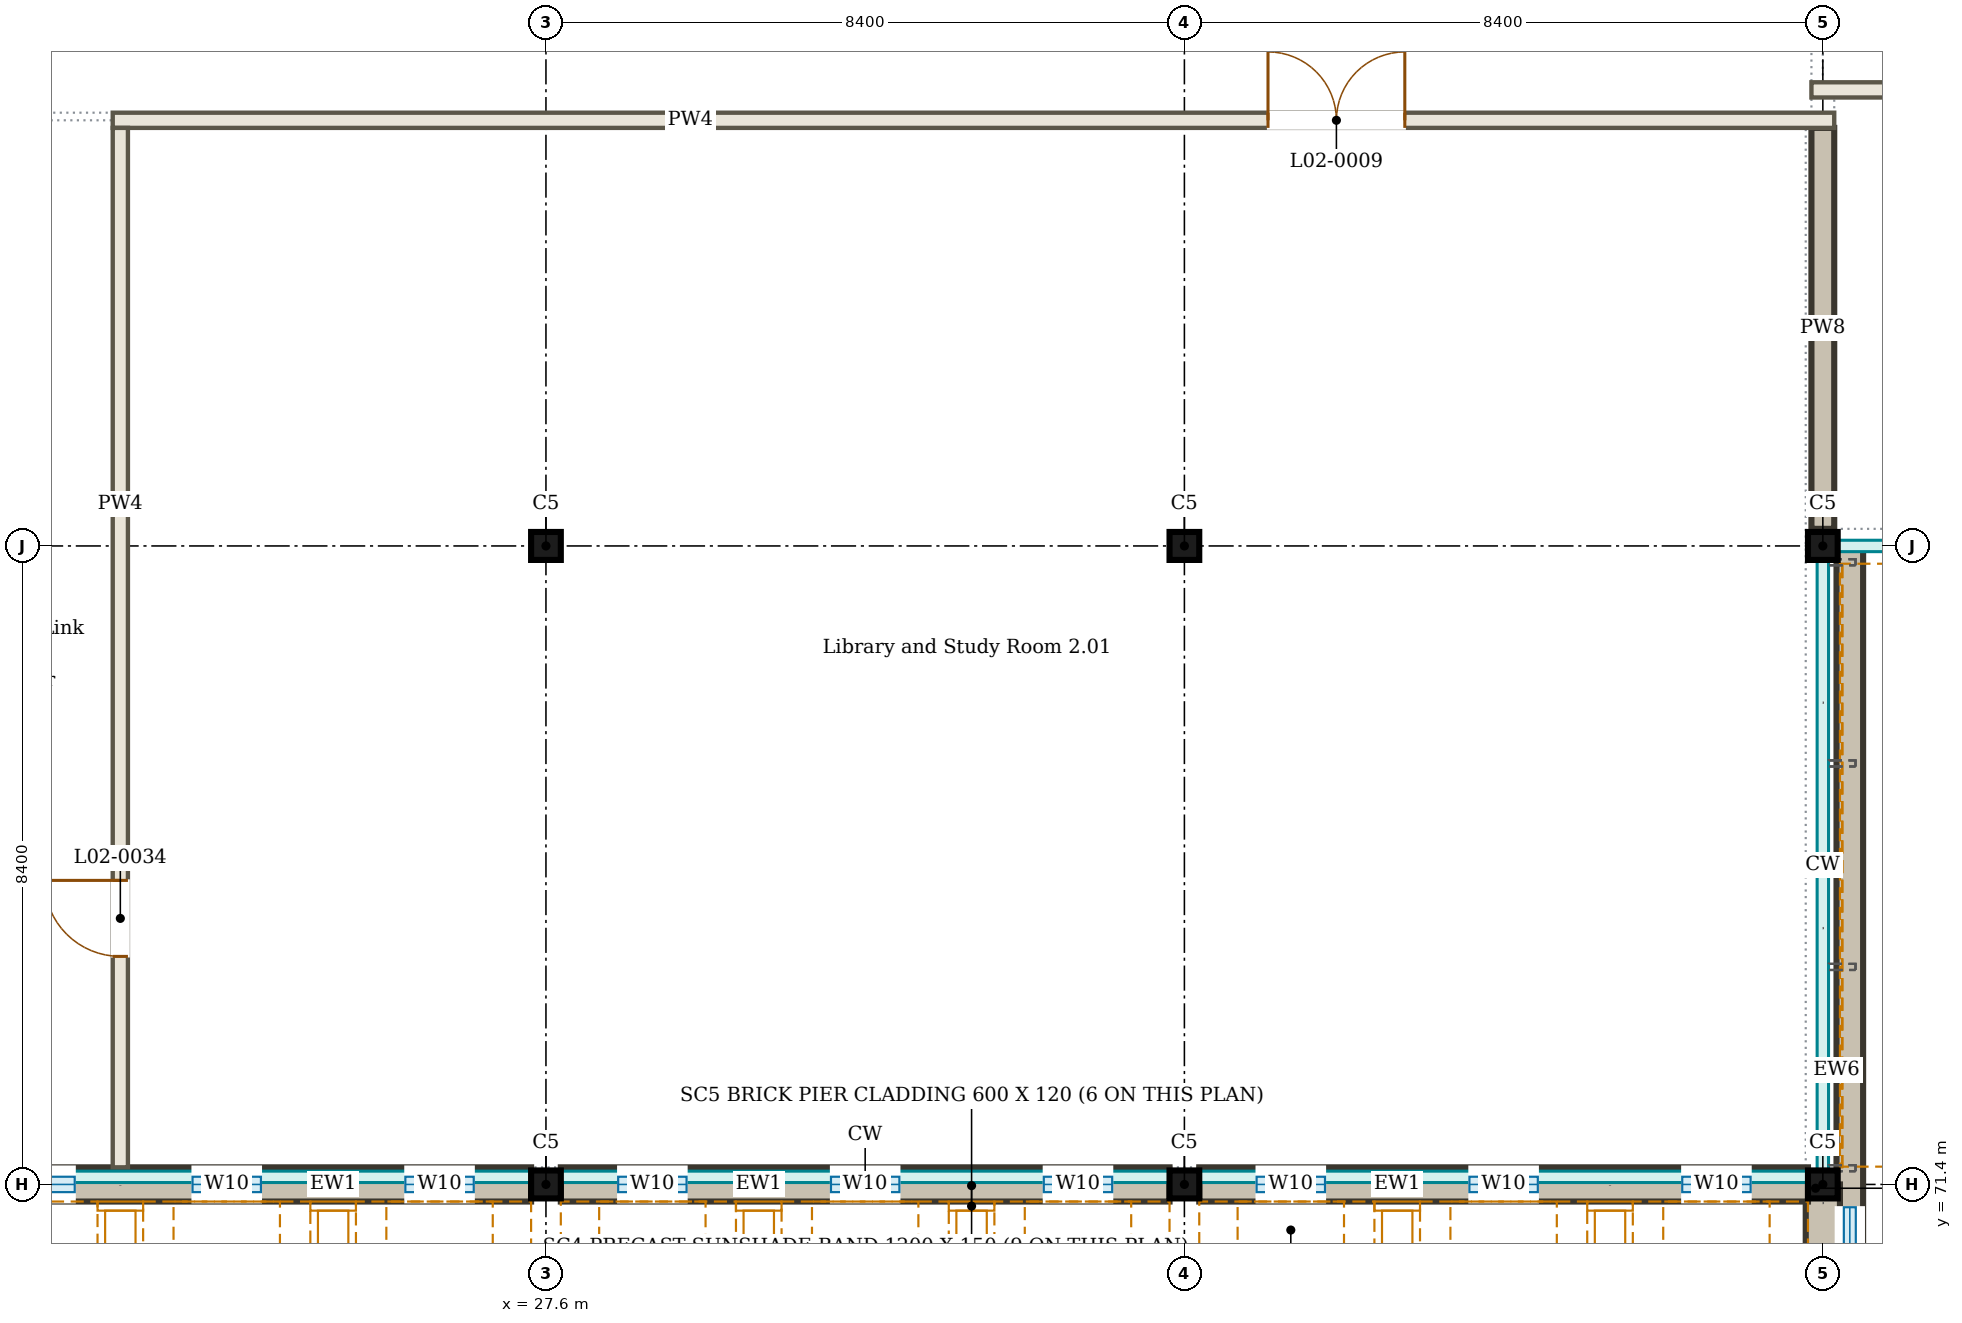
"""IFC4 building model, lengths in metres.
Left out: names, types, materials, properties, quantities, classifications, styles, units other than length and angle.
Written with IfcOpenShell. Run it as: python <this file> out.ifc"""

import sys

from ifc_helpers import new_model, si_unit, direction, frame, frame_2d, origin, origin_2d, place, context, subcontext, project, spatial, polyline, rectangle, i_section, outline, extrude, element, fill, save


model = new_model("IFC4")
c1 = context("Model", 3, precision=1e-05, world=origin(), true_north=direction((0.0, 1.0)))
c2 = subcontext(c1, "Body", "Model", "MODEL_VIEW")
j1 = project(units=[si_unit("LENGTHUNIT", "METRE"), si_unit("PLANEANGLEUNIT", "RADIAN")], contexts=[c1])
p1 = place(None, origin())
s1 = spatial("IfcSite", under=j1, at=p1, CompositionType="ELEMENT")
p2 = place(p1, origin())
s2 = spatial("IfcBuilding", under=s1, at=p2, CompositionType="ELEMENT")
p3 = place(p2, frame((0.0, 0.0, 9.0)))
s3 = spatial("IfcBuildingStorey", under=s2, at=p3, CompositionType="ELEMENT", Elevation=9.0)
for number, where, z_axis, x_axis in (
    (1, (27.6, 71.4, 0.0), (0.0, 0.0, 1.0), (1.0, 0.0, 0.0)),
    (2, (36.0, 71.4, 0.0), (0.0, 0.0, 1.0), (1.0, 0.0, 0.0)),
    (3, (44.4, 71.4, 0.0), (0.0, 0.0, 1.0), (1.0, 0.0, 0.0)),
    (4, (27.6, 79.8, 0.0), (0.0, 0.0, 1.0), (1.0, 0.0, 0.0)),
    (5, (36.0, 79.8, 0.0), (0.0, 0.0, 1.0), (1.0, 0.0, 0.0)),
    (6, (44.4, 79.8, 0.0), (0.0, 0.0, 1.0), (1.0, 0.0, 0.0)),
):
    element("IfcColumn", number, at=place(p3, frame(where, z_axis=z_axis, x_axis=x_axis)), inside=s3, PredefinedType="COLUMN", context=c2, shape_type="SweptSolid", body=[
        extrude(i_section(OverallWidth=0.391, OverallDepth=0.368, WebThickness=0.015, FlangeThickness=0.024, FilletRadius=0.027, at=origin_2d()), origin(), (0.0, 0.0, 1.0), 4.5),
    ])
p4 = place(p3, frame((44.56, 71.584, 3.87), z_axis=(0.0, 0.0, 1.0), x_axis=(0.0, 1.0, 0.0)))
e7 = element("IfcWall", 7, at=p4, inside=s3, PredefinedType="SOLIDWALL", context=c2, shape_type="SweptSolid", body=[
    extrude(rectangle(XDim=8.032, YDim=0.13, at=frame_2d((4.016, 0.0))), origin(), (0.0, 0.0, 1.0), 0.63),
])
p5 = place(p3, frame((19.2, 71.4, 0.0), z_axis=(0.0, 0.0, 1.0), x_axis=(1.0, 0.0, 0.0)))
e8 = element("IfcWall", 8, at=p5, inside=s3, PredefinedType="SOLIDWALL", context=c2, shape_type="SweptSolid", body=[
    extrude(rectangle(XDim=8.205, YDim=0.45, at=frame_2d((4.102, 0.0))), origin(), (0.0, 0.0, 1.0), 3.85),
])
p6 = place(p5, frame((0.6, 0.0, 2.7)))
e9 = element("IfcOpeningElement", 9, at=p6, cuts=e8, PredefinedType="OPENING", context=c2, shape_type="SweptSolid", body=[
    extrude(rectangle(XDim=1.6, YDim=0.6, at=frame_2d((0.8, 0.3))), frame((0.0, 0.235, 0.0), z_axis=(0.0, -1.0, 0.0), x_axis=(1.0, 0.0, 0.0)), (0.0, 0.0, 1.0), 0.47),
])
p7 = place(p5, frame((3.75, 0.0, 1.0)))
e10 = element("IfcOpeningElement", 10, at=p7, cuts=e8, PredefinedType="OPENING", context=c2, shape_type="SweptSolid", body=[
    extrude(rectangle(XDim=0.9, YDim=1.2, at=frame_2d((0.45, 0.6))), frame((0.0, 0.235, 0.0), z_axis=(0.0, -1.0, 0.0), x_axis=(1.0, 0.0, 0.0)), (0.0, 0.0, 1.0), 0.47),
])
p8 = place(p5, frame((6.55, 0.0, 1.0)))
e11 = element("IfcOpeningElement", 11, at=p8, cuts=e8, PredefinedType="OPENING", context=c2, shape_type="SweptSolid", body=[
    extrude(rectangle(XDim=0.9, YDim=1.2, at=frame_2d((0.45, 0.6))), frame((0.0, 0.235, 0.0), z_axis=(0.0, -1.0, 0.0), x_axis=(1.0, 0.0, 0.0)), (0.0, 0.0, 1.0), 0.47),
])
p9 = place(p3, frame((19.2, 71.24, 3.87), z_axis=(0.0, 0.0, 1.0), x_axis=(1.0, 0.0, 0.0)))
e12 = element("IfcWall", 12, at=p9, inside=s3, PredefinedType="SOLIDWALL", context=c2, shape_type="SweptSolid", body=[
    extrude(rectangle(XDim=8.205, YDim=0.13, at=frame_2d((4.102, 0.0))), origin(), (0.0, 0.0, 1.0), 0.63),
])
p10 = place(p3, frame((27.795, 71.4, 0.0), z_axis=(0.0, 0.0, 1.0), x_axis=(1.0, 0.0, 0.0)))
e13 = element("IfcWall", 13, at=p10, inside=s3, PredefinedType="SOLIDWALL", context=c2, shape_type="SweptSolid", body=[
    extrude(rectangle(XDim=8.009, YDim=0.45, at=frame_2d((4.004, 0.0))), origin(), (0.0, 0.0, 1.0), 3.85),
])
p11 = place(p10, frame((0.754, 0.0, 1.0)))
e14 = element("IfcOpeningElement", 14, at=p11, cuts=e13, PredefinedType="OPENING", context=c2, shape_type="SweptSolid", body=[
    extrude(rectangle(XDim=0.9, YDim=1.2, at=frame_2d((0.45, 0.6))), frame((0.0, 0.235, 0.0), z_axis=(0.0, -1.0, 0.0), x_axis=(1.0, 0.0, 0.0)), (0.0, 0.0, 1.0), 0.47),
])
p12 = place(p10, frame((3.554, 0.0, 1.0)))
e15 = element("IfcOpeningElement", 15, at=p12, cuts=e13, PredefinedType="OPENING", context=c2, shape_type="SweptSolid", body=[
    extrude(rectangle(XDim=0.9, YDim=1.2, at=frame_2d((0.45, 0.6))), frame((0.0, 0.235, 0.0), z_axis=(0.0, -1.0, 0.0), x_axis=(1.0, 0.0, 0.0)), (0.0, 0.0, 1.0), 0.47),
])
p13 = place(p10, frame((6.354, 0.0, 1.0)))
e16 = element("IfcOpeningElement", 16, at=p13, cuts=e13, PredefinedType="OPENING", context=c2, shape_type="SweptSolid", body=[
    extrude(rectangle(XDim=0.9, YDim=1.2, at=frame_2d((0.45, 0.6))), frame((0.0, 0.235, 0.0), z_axis=(0.0, -1.0, 0.0), x_axis=(1.0, 0.0, 0.0)), (0.0, 0.0, 1.0), 0.47),
])
p14 = place(p3, frame((27.795, 71.24, 3.87), z_axis=(0.0, 0.0, 1.0), x_axis=(1.0, 0.0, 0.0)))
e17 = element("IfcWall", 17, at=p14, inside=s3, PredefinedType="SOLIDWALL", context=c2, shape_type="SweptSolid", body=[
    extrude(rectangle(XDim=8.009, YDim=0.13, at=frame_2d((4.004, 0.0))), origin(), (0.0, 0.0, 1.0), 0.63),
])
p15 = place(p3, frame((36.196, 71.4, 0.0), z_axis=(0.0, 0.0, 1.0), x_axis=(1.0, 0.0, 0.0)))
e18 = element("IfcWall", 18, at=p15, inside=s3, PredefinedType="SOLIDWALL", context=c2, shape_type="SweptSolid", body=[
    extrude(rectangle(XDim=8.009, YDim=0.45, at=frame_2d((4.004, 0.0))), origin(), (0.0, 0.0, 1.0), 3.85),
])
p16 = place(p15, frame((0.754, 0.0, 1.0)))
e19 = element("IfcOpeningElement", 19, at=p16, cuts=e18, PredefinedType="OPENING", context=c2, shape_type="SweptSolid", body=[
    extrude(rectangle(XDim=0.9, YDim=1.2, at=frame_2d((0.45, 0.6))), frame((0.0, 0.235, 0.0), z_axis=(0.0, -1.0, 0.0), x_axis=(1.0, 0.0, 0.0)), (0.0, 0.0, 1.0), 0.47),
])
p17 = place(p15, frame((3.554, 0.0, 1.0)))
e20 = element("IfcOpeningElement", 20, at=p17, cuts=e18, PredefinedType="OPENING", context=c2, shape_type="SweptSolid", body=[
    extrude(rectangle(XDim=0.9, YDim=1.2, at=frame_2d((0.45, 0.6))), frame((0.0, 0.235, 0.0), z_axis=(0.0, -1.0, 0.0), x_axis=(1.0, 0.0, 0.0)), (0.0, 0.0, 1.0), 0.47),
])
p18 = place(p15, frame((6.354, 0.0, 1.0)))
e21 = element("IfcOpeningElement", 21, at=p18, cuts=e18, PredefinedType="OPENING", context=c2, shape_type="SweptSolid", body=[
    extrude(rectangle(XDim=0.9, YDim=1.2, at=frame_2d((0.45, 0.6))), frame((0.0, 0.235, 0.0), z_axis=(0.0, -1.0, 0.0), x_axis=(1.0, 0.0, 0.0)), (0.0, 0.0, 1.0), 0.47),
])
p19 = place(p3, frame((36.196, 71.24, 3.87), z_axis=(0.0, 0.0, 1.0), x_axis=(1.0, 0.0, 0.0)))
e22 = element("IfcWall", 22, at=p19, inside=s3, PredefinedType="SOLIDWALL", context=c2, shape_type="SweptSolid", body=[
    extrude(rectangle(XDim=8.009, YDim=0.13, at=frame_2d((4.004, 0.0))), origin(), (0.0, 0.0, 1.0), 0.63),
])
p20 = place(p3, frame((44.4, 63.0, 0.0), z_axis=(0.0, 0.0, 1.0), x_axis=(0.0, 1.0, 0.0)))
e23 = element("IfcWall", 23, at=p20, inside=s3, PredefinedType="SOLIDWALL", context=c2, shape_type="SweptSolid", body=[
    extrude(outline(polyline([(0.0, 0.0), (8.4, 0.0), (8.4, 1.58), (0.4, 0.2), (0.0, 0.0)])), frame((0.0, 0.225, 0.0), z_axis=(0.0, -1.0, 0.0), x_axis=(1.0, 0.0, 0.0)), (0.0, 0.0, 1.0), 0.45),
])
p21 = place(p3, frame((44.755, 54.6, 0.0), z_axis=(0.0, 0.0, 1.0), x_axis=(0.0, 1.0, 0.0)))
e24 = element("IfcWall", 24, at=p21, inside=s3, PredefinedType="SOLIDWALL", context=c2, shape_type="SweptSolid", body=[
    extrude(outline(polyline([(25.127, 0.0), (25.127, 3.9), (21.853, 4.453), (20.825, 5.339), (19.797, 6.063), (18.769, 6.655), (17.74, 7.133), (16.712, 7.511), (15.684, 7.798), (14.656, 7.999), (13.628, 8.118), (12.6, 8.158), (11.572, 8.118), (10.544, 7.999), (9.516, 7.798), (8.488, 7.511), (7.459, 7.133), (6.431, 6.655), (5.403, 6.063), (4.375, 5.339), (3.347, 4.453), (2.319, 3.356), (1.291, 1.952), (0.263, 0.0), (0.263, 0.0), (25.127, 0.0)])), frame((0.0, 0.175, 0.0), z_axis=(0.0, -1.0, 0.0), x_axis=(1.0, 0.0, 0.0)), (0.0, 0.0, 1.0), 0.35),
])
p22 = place(p21, frame((8.7, 0.0, 3.0)))
e25 = element("IfcOpeningElement", 25, at=p22, cuts=e24, PredefinedType="OPENING", context=c2, shape_type="SweptSolid", body=[
    extrude(rectangle(XDim=7.8, YDim=3.0, at=frame_2d((3.9, 1.5))), frame((0.0, 0.185, 0.0), z_axis=(0.0, -1.0, 0.0), x_axis=(1.0, 0.0, 0.0)), (0.0, 0.0, 1.0), 0.37),
])
p23 = place(p3, frame((21.9, 85.4, 0.0), z_axis=(0.0, 0.0, 1.0), x_axis=(1.0, 0.0, 0.0)))
e26 = element("IfcWall", 26, at=p23, inside=s3, PredefinedType="PARTITIONING", context=c2, shape_type="SweptSolid", body=[
    extrude(rectangle(XDim=22.65, YDim=0.2, at=frame_2d((11.325, 0.0))), origin(), (0.0, 0.0, 1.0), 3.8),
])
p24 = place(p23, frame((15.2, 0.0, 0.0)))
e27 = element("IfcOpeningElement", 27, at=p24, cuts=e26, PredefinedType="OPENING", context=c2, shape_type="SweptSolid", body=[
    extrude(rectangle(XDim=1.8, YDim=2.1, at=frame_2d((0.9, 1.05))), frame((0.0, 0.11, 0.0), z_axis=(0.0, -1.0, 0.0), x_axis=(1.0, 0.0, 0.0)), (0.0, 0.0, 1.0), 0.22),
])
p25 = place(p3, frame((44.25, 85.8, 0.0), z_axis=(0.0, 0.0, 1.0), x_axis=(1.0, 0.0, 0.0)))
e28 = element("IfcWall", 28, at=p25, inside=s3, PredefinedType="PARTITIONING", context=c2, shape_type="SweptSolid", body=[
    extrude(rectangle(XDim=67.5, YDim=0.2, at=frame_2d((33.75, 0.0))), origin(), (0.0, 0.0, 1.0), 3.9),
])
p26 = place(p25, frame((7.65, 0.0, 0.0)))
e29 = element("IfcOpeningElement", 29, at=p26, cuts=e28, PredefinedType="OPENING", context=c2, shape_type="SweptSolid", body=[
    extrude(rectangle(XDim=1.8, YDim=2.1, at=frame_2d((0.9, 1.05))), frame((0.0, 0.11, 0.0), z_axis=(0.0, -1.0, 0.0), x_axis=(1.0, 0.0, 0.0)), (0.0, 0.0, 1.0), 0.22),
])
p27 = place(p25, frame((19.25, 0.0, 0.0)))
e30 = element("IfcOpeningElement", 30, at=p27, cuts=e28, PredefinedType="OPENING", context=c2, shape_type="SweptSolid", body=[
    extrude(rectangle(XDim=1.0, YDim=2.1, at=frame_2d((0.5, 1.05))), frame((0.0, 0.11, 0.0), z_axis=(0.0, -1.0, 0.0), x_axis=(1.0, 0.0, 0.0)), (0.0, 0.0, 1.0), 0.22),
])
p28 = place(p25, frame((24.85, 0.0, 0.0)))
e31 = element("IfcOpeningElement", 31, at=p28, cuts=e28, PredefinedType="OPENING", context=c2, shape_type="SweptSolid", body=[
    extrude(rectangle(XDim=1.0, YDim=2.1, at=frame_2d((0.5, 1.05))), frame((0.0, 0.11, 0.0), z_axis=(0.0, -1.0, 0.0), x_axis=(1.0, 0.0, 0.0)), (0.0, 0.0, 1.0), 0.22),
])
p29 = place(p25, frame((31.85, 0.0, 0.0)))
e32 = element("IfcOpeningElement", 32, at=p29, cuts=e28, PredefinedType="OPENING", context=c2, shape_type="SweptSolid", body=[
    extrude(rectangle(XDim=1.0, YDim=2.1, at=frame_2d((0.5, 1.05))), frame((0.0, 0.11, 0.0), z_axis=(0.0, -1.0, 0.0), x_axis=(1.0, 0.0, 0.0)), (0.0, 0.0, 1.0), 0.22),
])
p30 = place(p25, frame((44.05, 0.0, 0.0)))
e33 = element("IfcOpeningElement", 33, at=p30, cuts=e28, PredefinedType="OPENING", context=c2, shape_type="SweptSolid", body=[
    extrude(rectangle(XDim=1.8, YDim=2.1, at=frame_2d((0.9, 1.05))), frame((0.0, 0.11, 0.0), z_axis=(0.0, -1.0, 0.0), x_axis=(1.0, 0.0, 0.0)), (0.0, 0.0, 1.0), 0.22),
])
p31 = place(p25, frame((55.65, 0.0, 0.0)))
e34 = element("IfcOpeningElement", 34, at=p31, cuts=e28, PredefinedType="OPENING", context=c2, shape_type="SweptSolid", body=[
    extrude(rectangle(XDim=1.0, YDim=2.1, at=frame_2d((0.5, 1.05))), frame((0.0, 0.11, 0.0), z_axis=(0.0, -1.0, 0.0), x_axis=(1.0, 0.0, 0.0)), (0.0, 0.0, 1.0), 0.22),
])
p32 = place(p25, frame((62.65, 0.0, 0.0)))
e35 = element("IfcOpeningElement", 35, at=p32, cuts=e28, PredefinedType="OPENING", context=c2, shape_type="SweptSolid", body=[
    extrude(rectangle(XDim=1.0, YDim=2.1, at=frame_2d((0.5, 1.05))), frame((0.0, 0.11, 0.0), z_axis=(0.0, -1.0, 0.0), x_axis=(1.0, 0.0, 0.0)), (0.0, 0.0, 1.0), 0.22),
])
p33 = place(p3, frame((22.0, 71.625, 0.0), z_axis=(0.0, 0.0, 1.0), x_axis=(0.0, 1.0, 0.0)))
e36 = element("IfcWall", 36, at=p33, inside=s3, PredefinedType="PARTITIONING", context=c2, shape_type="SweptSolid", body=[
    extrude(rectangle(XDim=13.675, YDim=0.2, at=frame_2d((6.837, 0.0))), origin(), (0.0, 0.0, 1.0), 3.8),
])
p34 = place(p33, frame((2.775, 0.0, 0.0)))
e37 = element("IfcOpeningElement", 37, at=p34, cuts=e36, PredefinedType="OPENING", context=c2, shape_type="SweptSolid", body=[
    extrude(rectangle(XDim=1.0, YDim=2.1, at=frame_2d((0.5, 1.05))), frame((0.0, 0.11, 0.0), z_axis=(0.0, -1.0, 0.0), x_axis=(1.0, 0.0, 0.0)), (0.0, 0.0, 1.0), 0.22),
])
p35 = place(p3, frame((44.4, 80.025, 0.0), z_axis=(0.0, 0.0, 1.0), x_axis=(0.0, 1.0, 0.0)))
e38 = element("IfcWall", 38, at=p35, inside=s3, PredefinedType="SOLIDWALL", context=c2, shape_type="SweptSolid", body=[
    extrude(rectangle(XDim=5.275, YDim=0.3, at=frame_2d((2.638, 0.0))), origin(), (0.0, 0.0, 1.0), 3.936),
])
p36 = place(p6, origin())
e39 = element("IfcWindow", 39, at=p36, inside=s3, PartitioningType="SINGLE_PANEL", PredefinedType="WINDOW", context=c2, shape_type="SweptSolid", body=[
    extrude(rectangle(XDim=1.6, YDim=0.6, at=frame_2d((0.8, 0.3))), frame((0.0, 0.03, 0.0), z_axis=(0.0, -1.0, 0.0), x_axis=(1.0, 0.0, 0.0)), (0.0, 0.0, 1.0), 0.06),
])
fill(e9, e39)
p37 = place(p7, origin())
e40 = element("IfcWindow", 40, at=p37, inside=s3, PartitioningType="SINGLE_PANEL", PredefinedType="WINDOW", context=c2, shape_type="SweptSolid", body=[
    extrude(rectangle(XDim=0.9, YDim=1.2, at=frame_2d((0.45, 0.6))), frame((0.0, 0.135, 0.0), z_axis=(0.0, -1.0, 0.0), x_axis=(1.0, 0.0, 0.0)), (0.0, 0.0, 1.0), 0.06),
])
fill(e10, e40)
p38 = place(p8, origin())
e41 = element("IfcWindow", 41, at=p38, inside=s3, PartitioningType="SINGLE_PANEL", PredefinedType="WINDOW", context=c2, shape_type="SweptSolid", body=[
    extrude(rectangle(XDim=0.9, YDim=1.2, at=frame_2d((0.45, 0.6))), frame((0.0, 0.135, 0.0), z_axis=(0.0, -1.0, 0.0), x_axis=(1.0, 0.0, 0.0)), (0.0, 0.0, 1.0), 0.06),
])
fill(e11, e41)
p39 = place(p11, origin())
e42 = element("IfcWindow", 42, at=p39, inside=s3, PartitioningType="SINGLE_PANEL", PredefinedType="WINDOW", context=c2, shape_type="SweptSolid", body=[
    extrude(rectangle(XDim=0.9, YDim=1.2, at=frame_2d((0.45, 0.6))), frame((0.0, 0.135, 0.0), z_axis=(0.0, -1.0, 0.0), x_axis=(1.0, 0.0, 0.0)), (0.0, 0.0, 1.0), 0.06),
])
fill(e14, e42)
p40 = place(p12, origin())
e43 = element("IfcWindow", 43, at=p40, inside=s3, PartitioningType="SINGLE_PANEL", PredefinedType="WINDOW", context=c2, shape_type="SweptSolid", body=[
    extrude(rectangle(XDim=0.9, YDim=1.2, at=frame_2d((0.45, 0.6))), frame((0.0, 0.135, 0.0), z_axis=(0.0, -1.0, 0.0), x_axis=(1.0, 0.0, 0.0)), (0.0, 0.0, 1.0), 0.06),
])
fill(e15, e43)
p41 = place(p13, origin())
e44 = element("IfcWindow", 44, at=p41, inside=s3, PartitioningType="SINGLE_PANEL", PredefinedType="WINDOW", context=c2, shape_type="SweptSolid", body=[
    extrude(rectangle(XDim=0.9, YDim=1.2, at=frame_2d((0.45, 0.6))), frame((0.0, 0.135, 0.0), z_axis=(0.0, -1.0, 0.0), x_axis=(1.0, 0.0, 0.0)), (0.0, 0.0, 1.0), 0.06),
])
fill(e16, e44)
p42 = place(p16, origin())
e45 = element("IfcWindow", 45, at=p42, inside=s3, PartitioningType="SINGLE_PANEL", PredefinedType="WINDOW", context=c2, shape_type="SweptSolid", body=[
    extrude(rectangle(XDim=0.9, YDim=1.2, at=frame_2d((0.45, 0.6))), frame((0.0, 0.135, 0.0), z_axis=(0.0, -1.0, 0.0), x_axis=(1.0, 0.0, 0.0)), (0.0, 0.0, 1.0), 0.06),
])
fill(e19, e45)
p43 = place(p17, origin())
e46 = element("IfcWindow", 46, at=p43, inside=s3, PartitioningType="SINGLE_PANEL", PredefinedType="WINDOW", context=c2, shape_type="SweptSolid", body=[
    extrude(rectangle(XDim=0.9, YDim=1.2, at=frame_2d((0.45, 0.6))), frame((0.0, 0.135, 0.0), z_axis=(0.0, -1.0, 0.0), x_axis=(1.0, 0.0, 0.0)), (0.0, 0.0, 1.0), 0.06),
])
fill(e20, e46)
p44 = place(p18, origin())
e47 = element("IfcWindow", 47, at=p44, inside=s3, PartitioningType="SINGLE_PANEL", PredefinedType="WINDOW", context=c2, shape_type="SweptSolid", body=[
    extrude(rectangle(XDim=0.9, YDim=1.2, at=frame_2d((0.45, 0.6))), frame((0.0, 0.135, 0.0), z_axis=(0.0, -1.0, 0.0), x_axis=(1.0, 0.0, 0.0)), (0.0, 0.0, 1.0), 0.06),
])
fill(e21, e47)
p45 = place(p22, origin())
e48 = element("IfcWindow", 48, at=p45, inside=s3, PartitioningType="SINGLE_PANEL", PredefinedType="WINDOW", context=c2, shape_type="SweptSolid", body=[
    extrude(rectangle(XDim=7.8, YDim=3.0, at=frame_2d((3.9, 1.5))), frame((0.0, 0.03, 0.0), z_axis=(0.0, -1.0, 0.0), x_axis=(1.0, 0.0, 0.0)), (0.0, 0.0, 1.0), 0.06),
])
fill(e25, e48)
p46 = place(p24, origin())
e49 = element("IfcDoor", 49, at=p46, inside=s3, OperationType="DOUBLE_DOOR_SINGLE_SWING", PredefinedType="DOOR", context=c2, shape_type="SweptSolid", body=[
    extrude(rectangle(XDim=1.8, YDim=2.1, at=frame_2d((0.9, 1.05))), frame((0.0, 0.025, 0.0), z_axis=(0.0, -1.0, 0.0), x_axis=(1.0, 0.0, 0.0)), (0.0, 0.0, 1.0), 0.05),
])
fill(e27, e49)
p47 = place(p34, origin())
e50 = element("IfcDoor", 50, at=p47, inside=s3, OperationType="SINGLE_SWING_RIGHT", PredefinedType="DOOR", context=c2, shape_type="SweptSolid", body=[
    extrude(rectangle(XDim=1.0, YDim=2.1, at=frame_2d((0.5, 1.05))), frame((0.0, 0.025, 0.0), z_axis=(0.0, -1.0, 0.0), x_axis=(1.0, 0.0, 0.0)), (0.0, 0.0, 1.0), 0.05),
])
fill(e37, e50)
save(model, sys.argv[1])
